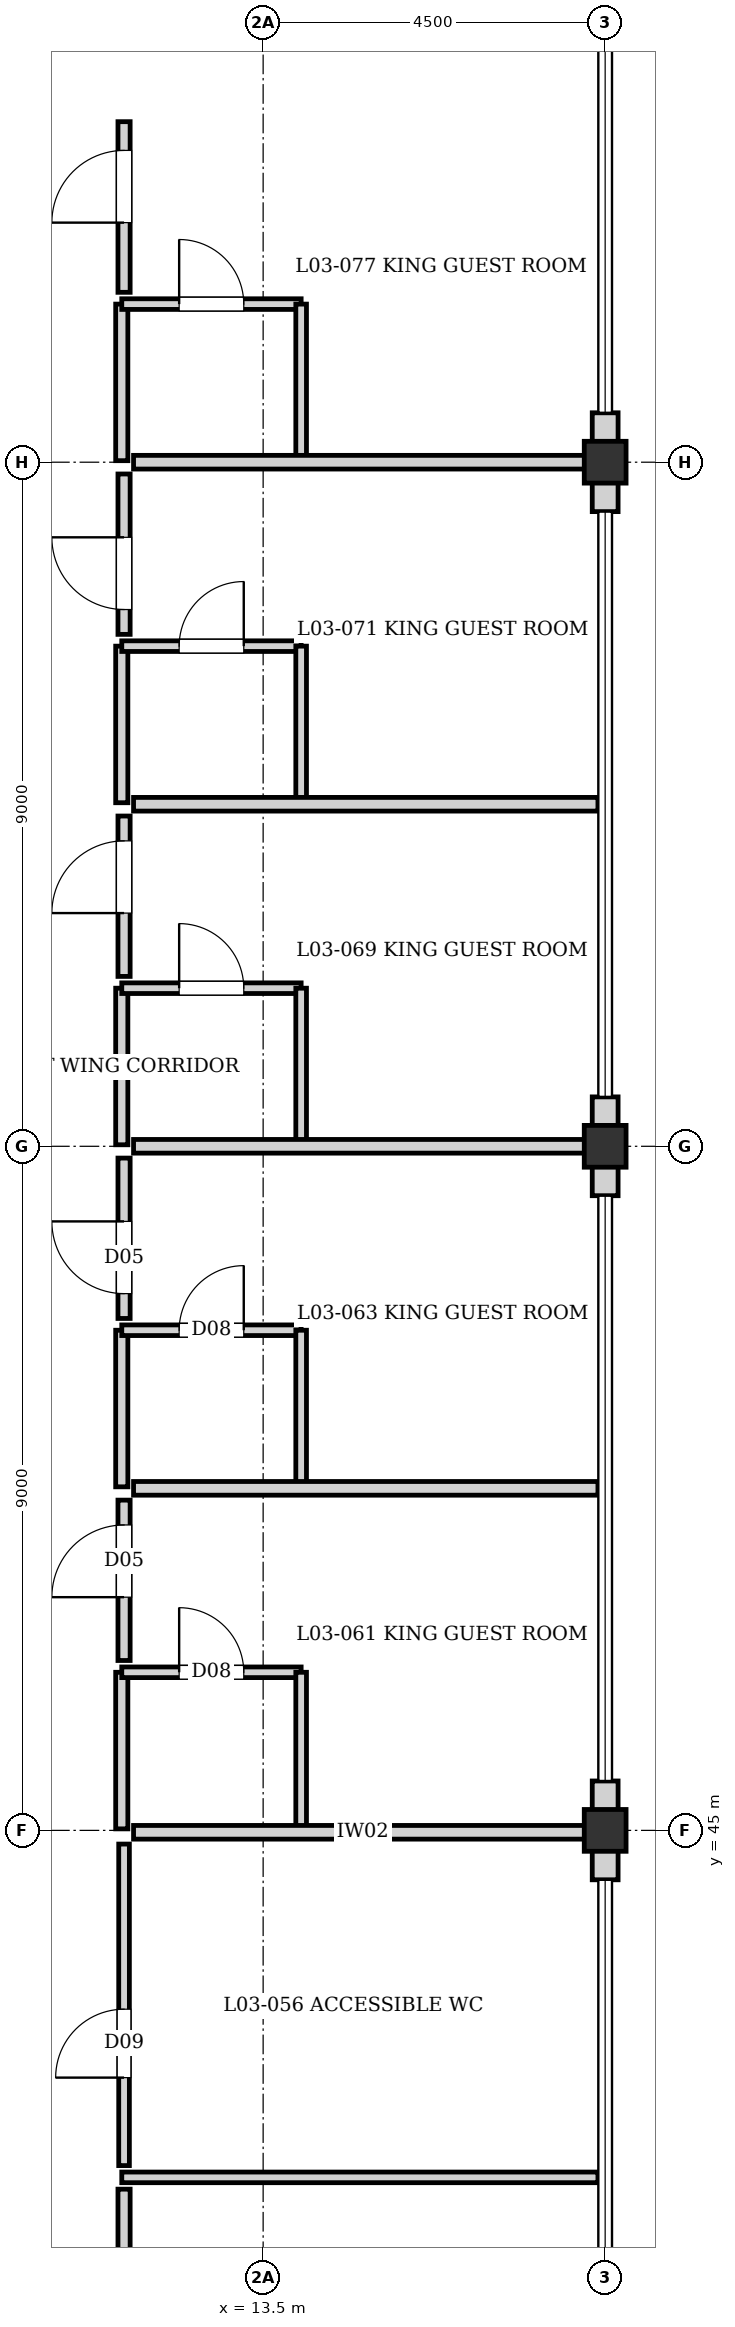
"""IFC4 building model, lengths in metres.
Left out: names, types, materials, properties, quantities, classifications, styles, units other than length and angle.
Written with IfcOpenShell. Run it as: python <this file> out.ifc"""

import sys

from ifc_helpers import new_model, si_unit, direction, frame, frame_2d, origin, origin_2d, place, context, subcontext, project, spatial, rectangle, extrude, element, fill, save


model = new_model("IFC4")
c1 = context("Model", 3, precision=1e-05, world=origin(), true_north=direction((0.0, 1.0)))
c2 = subcontext(c1, "Body", "Model", "MODEL_VIEW")
j1 = project(units=[si_unit("LENGTHUNIT", "METRE"), si_unit("PLANEANGLEUNIT", "RADIAN")], contexts=[c1])
p1 = place(None, origin())
s1 = spatial("IfcSite", under=j1, at=p1, CompositionType="ELEMENT")
p2 = place(p1, origin())
s2 = spatial("IfcBuilding", under=s1, at=p2, CompositionType="ELEMENT")
p3 = place(p2, frame((0.0, 0.0, 11.52)))
s3 = spatial("IfcBuildingStorey", under=s2, at=p3, CompositionType="ELEMENT", Elevation=11.52)
for number, where, z_axis, x_axis in (
    (1, (18.0, 45.0, 0.0), (0.0, 0.0, 1.0), (1.0, 0.0, 0.0)),
    (2, (18.0, 54.0, 0.0), (0.0, 0.0, 1.0), (1.0, 0.0, 0.0)),
    (3, (18.0, 63.0, 0.0), (0.0, 0.0, 1.0), (1.0, 0.0, 0.0)),
):
    element("IfcColumn", number, at=place(p3, frame(where, z_axis=z_axis, x_axis=x_axis)), inside=s3, PredefinedType="COLUMN", context=c2, shape_type="SweptSolid", body=[
        extrude(rectangle(XDim=0.55, YDim=0.55, at=origin_2d()), origin(), (0.0, 0.0, 1.0), 3.04),
    ])
p4 = place(p3, frame((18.0, 63.65, 0.0), z_axis=(0.0, 0.0, 1.0), x_axis=(0.0, -1.0, 0.0)))
e4 = element("IfcWall", 4, at=p4, inside=s3, PredefinedType="SOLIDWALL", context=c2, shape_type="SweptSolid", body=[
    extrude(rectangle(XDim=0.65, YDim=0.34, at=frame_2d((0.325, 0.0))), origin(), (0.0, 0.0, 1.0), 2.48),
])
for number, where, z_axis, x_axis in (
    (5, (18.0, 63.0, 0.0), (0.0, 0.0, 1.0), (0.0, -1.0, 0.0)),
    (6, (18.0, 54.65, 0.0), (0.0, 0.0, 1.0), (0.0, -1.0, 0.0)),
):
    element("IfcWall", number, at=place(p3, frame(where, z_axis=z_axis, x_axis=x_axis)), inside=s3, PredefinedType="SOLIDWALL", context=c2, shape_type="SweptSolid", body=[
        extrude(rectangle(XDim=0.65, YDim=0.34, at=frame_2d((0.325, 0.0))), origin(), (0.0, 0.0, 1.0), 2.82),
    ])
for number, where, z_axis, x_axis in (
    (7, (18.0, 54.0, 0.0), (0.0, 0.0, 1.0), (0.0, -1.0, 0.0)),
    (8, (18.0, 45.65, 0.0), (0.0, 0.0, 1.0), (0.0, -1.0, 0.0)),
):
    element("IfcWall", number, at=place(p3, frame(where, z_axis=z_axis, x_axis=x_axis)), inside=s3, PredefinedType="SOLIDWALL", context=c2, shape_type="SweptSolid", body=[
        extrude(rectangle(XDim=0.65, YDim=0.34, at=frame_2d((0.325, 0.0))), origin(), (0.0, 0.0, 1.0), 2.38),
    ])
p5 = place(p3, frame((18.0, 45.0, 0.0), z_axis=(0.0, 0.0, 1.0), x_axis=(0.0, -1.0, 0.0)))
e9 = element("IfcWall", 9, at=p5, inside=s3, PredefinedType="SOLIDWALL", context=c2, shape_type="SweptSolid", body=[
    extrude(rectangle(XDim=0.65, YDim=0.34, at=frame_2d((0.325, 0.0))), origin(), (0.0, 0.0, 1.0), 2.42),
])
p6 = place(p3, frame((11.64, 45.02, 0.0), z_axis=(0.0, 0.0, 1.0), x_axis=(0.0, 1.0, 0.0)))
e10 = element("IfcWall", 10, at=p6, inside=s3, PredefinedType="PARTITIONING", context=c2, shape_type="SweptSolid", body=[
    extrude(rectangle(XDim=2.06, YDim=0.16, at=frame_2d((1.03, 0.0))), origin(), (0.0, 0.0, 1.0), 2.82),
])
p7 = place(p3, frame((11.64, 47.08, 0.0), z_axis=(0.0, 0.0, 1.0), x_axis=(1.0, 0.0, 0.0)))
e11 = element("IfcWall", 11, at=p7, inside=s3, PredefinedType="PLUMBINGWALL", context=c2, shape_type="SweptSolid", body=[
    extrude(rectangle(XDim=2.36, YDim=0.14, at=frame_2d((1.18, 0.0))), origin(), (0.0, 0.0, 1.0), 2.82),
])
p8 = place(p7, frame((0.755, 0.0, 0.0)))
e12 = element("IfcOpeningElement", 12, at=p8, cuts=e11, PredefinedType="OPENING", context=c2, shape_type="SweptSolid", body=[
    extrude(rectangle(XDim=0.85, YDim=2.04, at=frame_2d((0.425, 1.02))), frame((0.0, 0.08, 0.0), z_axis=(0.0, -1.0, 0.0), x_axis=(1.0, 0.0, 0.0)), (0.0, 0.0, 1.0), 0.16),
])
p9 = place(p3, frame((14.0, 45.02, 0.0), z_axis=(0.0, 0.0, 1.0), x_axis=(0.0, 1.0, 0.0)))
e13 = element("IfcWall", 13, at=p9, inside=s3, PredefinedType="PLUMBINGWALL", context=c2, shape_type="SweptSolid", body=[
    extrude(rectangle(XDim=2.06, YDim=0.14, at=frame_2d((1.03, 0.0))), origin(), (0.0, 0.0, 1.0), 2.82),
])
p10 = place(p3, frame((11.64, 49.52, 0.0), z_axis=(0.0, 0.0, 1.0), x_axis=(0.0, 1.0, 0.0)))
e14 = element("IfcWall", 14, at=p10, inside=s3, PredefinedType="PARTITIONING", context=c2, shape_type="SweptSolid", body=[
    extrude(rectangle(XDim=2.06, YDim=0.16, at=frame_2d((1.03, 0.0))), origin(), (0.0, 0.0, 1.0), 2.82),
])
p11 = place(p3, frame((11.64, 51.58, 0.0), z_axis=(0.0, 0.0, 1.0), x_axis=(1.0, 0.0, 0.0)))
e15 = element("IfcWall", 15, at=p11, inside=s3, PredefinedType="PLUMBINGWALL", context=c2, shape_type="SweptSolid", body=[
    extrude(rectangle(XDim=2.36, YDim=0.14, at=frame_2d((1.18, 0.0))), origin(), (0.0, 0.0, 1.0), 2.82),
])
p12 = place(p11, frame((0.755, 0.0, 0.0)))
e16 = element("IfcOpeningElement", 16, at=p12, cuts=e15, PredefinedType="OPENING", context=c2, shape_type="SweptSolid", body=[
    extrude(rectangle(XDim=0.85, YDim=2.04, at=frame_2d((0.425, 1.02))), frame((0.0, 0.08, 0.0), z_axis=(0.0, -1.0, 0.0), x_axis=(1.0, 0.0, 0.0)), (0.0, 0.0, 1.0), 0.16),
])
p13 = place(p3, frame((14.0, 49.52, 0.0), z_axis=(0.0, 0.0, 1.0), x_axis=(0.0, 1.0, 0.0)))
e17 = element("IfcWall", 17, at=p13, inside=s3, PredefinedType="PLUMBINGWALL", context=c2, shape_type="SweptSolid", body=[
    extrude(rectangle(XDim=2.06, YDim=0.14, at=frame_2d((1.03, 0.0))), origin(), (0.0, 0.0, 1.0), 2.82),
])
p14 = place(p3, frame((11.64, 54.02, 0.0), z_axis=(0.0, 0.0, 1.0), x_axis=(0.0, 1.0, 0.0)))
e18 = element("IfcWall", 18, at=p14, inside=s3, PredefinedType="PARTITIONING", context=c2, shape_type="SweptSolid", body=[
    extrude(rectangle(XDim=2.06, YDim=0.16, at=frame_2d((1.03, 0.0))), origin(), (0.0, 0.0, 1.0), 2.82),
])
p15 = place(p3, frame((11.64, 56.08, 0.0), z_axis=(0.0, 0.0, 1.0), x_axis=(1.0, 0.0, 0.0)))
e19 = element("IfcWall", 19, at=p15, inside=s3, PredefinedType="PLUMBINGWALL", context=c2, shape_type="SweptSolid", body=[
    extrude(rectangle(XDim=2.36, YDim=0.14, at=frame_2d((1.18, 0.0))), origin(), (0.0, 0.0, 1.0), 2.82),
])
p16 = place(p15, frame((0.755, 0.0, 0.0)))
e20 = element("IfcOpeningElement", 20, at=p16, cuts=e19, PredefinedType="OPENING", context=c2, shape_type="SweptSolid", body=[
    extrude(rectangle(XDim=0.85, YDim=2.04, at=frame_2d((0.425, 1.02))), frame((0.0, 0.08, 0.0), z_axis=(0.0, -1.0, 0.0), x_axis=(1.0, 0.0, 0.0)), (0.0, 0.0, 1.0), 0.16),
])
p17 = place(p3, frame((14.0, 54.02, 0.0), z_axis=(0.0, 0.0, 1.0), x_axis=(0.0, 1.0, 0.0)))
e21 = element("IfcWall", 21, at=p17, inside=s3, PredefinedType="PLUMBINGWALL", context=c2, shape_type="SweptSolid", body=[
    extrude(rectangle(XDim=2.06, YDim=0.14, at=frame_2d((1.03, 0.0))), origin(), (0.0, 0.0, 1.0), 2.82),
])
p18 = place(p3, frame((11.64, 58.52, 0.0), z_axis=(0.0, 0.0, 1.0), x_axis=(0.0, 1.0, 0.0)))
e22 = element("IfcWall", 22, at=p18, inside=s3, PredefinedType="PARTITIONING", context=c2, shape_type="SweptSolid", body=[
    extrude(rectangle(XDim=2.06, YDim=0.16, at=frame_2d((1.03, 0.0))), origin(), (0.0, 0.0, 1.0), 2.82),
])
p19 = place(p3, frame((11.64, 60.58, 0.0), z_axis=(0.0, 0.0, 1.0), x_axis=(1.0, 0.0, 0.0)))
e23 = element("IfcWall", 23, at=p19, inside=s3, PredefinedType="PLUMBINGWALL", context=c2, shape_type="SweptSolid", body=[
    extrude(rectangle(XDim=2.36, YDim=0.14, at=frame_2d((1.18, 0.0))), origin(), (0.0, 0.0, 1.0), 2.82),
])
p20 = place(p19, frame((0.755, 0.0, 0.0)))
e24 = element("IfcOpeningElement", 24, at=p20, cuts=e23, PredefinedType="OPENING", context=c2, shape_type="SweptSolid", body=[
    extrude(rectangle(XDim=0.85, YDim=2.04, at=frame_2d((0.425, 1.02))), frame((0.0, 0.08, 0.0), z_axis=(0.0, -1.0, 0.0), x_axis=(1.0, 0.0, 0.0)), (0.0, 0.0, 1.0), 0.16),
])
p21 = place(p3, frame((14.0, 58.52, 0.0), z_axis=(0.0, 0.0, 1.0), x_axis=(0.0, 1.0, 0.0)))
e25 = element("IfcWall", 25, at=p21, inside=s3, PredefinedType="PLUMBINGWALL", context=c2, shape_type="SweptSolid", body=[
    extrude(rectangle(XDim=2.06, YDim=0.14, at=frame_2d((1.03, 0.0))), origin(), (0.0, 0.0, 1.0), 2.82),
])
p22 = place(p3, frame((11.64, 63.02, 0.0), z_axis=(0.0, 0.0, 1.0), x_axis=(0.0, 1.0, 0.0)))
e26 = element("IfcWall", 26, at=p22, inside=s3, PredefinedType="PARTITIONING", context=c2, shape_type="SweptSolid", body=[
    extrude(rectangle(XDim=2.06, YDim=0.16, at=frame_2d((1.03, 0.0))), origin(), (0.0, 0.0, 1.0), 2.82),
])
p23 = place(p3, frame((11.64, 65.08, 0.0), z_axis=(0.0, 0.0, 1.0), x_axis=(1.0, 0.0, 0.0)))
e27 = element("IfcWall", 27, at=p23, inside=s3, PredefinedType="PLUMBINGWALL", context=c2, shape_type="SweptSolid", body=[
    extrude(rectangle(XDim=2.36, YDim=0.14, at=frame_2d((1.18, 0.0))), origin(), (0.0, 0.0, 1.0), 2.82),
])
p24 = place(p23, frame((0.755, 0.0, 0.0)))
e28 = element("IfcOpeningElement", 28, at=p24, cuts=e27, PredefinedType="OPENING", context=c2, shape_type="SweptSolid", body=[
    extrude(rectangle(XDim=0.85, YDim=2.04, at=frame_2d((0.425, 1.02))), frame((0.0, 0.08, 0.0), z_axis=(0.0, -1.0, 0.0), x_axis=(1.0, 0.0, 0.0)), (0.0, 0.0, 1.0), 0.16),
])
p25 = place(p3, frame((14.0, 63.02, 0.0), z_axis=(0.0, 0.0, 1.0), x_axis=(0.0, 1.0, 0.0)))
e29 = element("IfcWall", 29, at=p25, inside=s3, PredefinedType="PLUMBINGWALL", context=c2, shape_type="SweptSolid", body=[
    extrude(rectangle(XDim=2.06, YDim=0.14, at=frame_2d((1.03, 0.0))), origin(), (0.0, 0.0, 1.0), 2.82),
])
p26 = place(p3, frame((11.795, 44.975, 0.0), z_axis=(0.0, 0.0, 1.0), x_axis=(1.0, 0.0, 0.0)))
e30 = element("IfcWall", 30, at=p26, inside=s3, PredefinedType="PARTITIONING", context=c2, shape_type="SweptSolid", body=[
    extrude(rectangle(XDim=6.03, YDim=0.18, at=frame_2d((3.015, 0.0))), origin(), (0.0, 0.0, 1.0), 2.42),
])
p27 = place(p3, frame((11.795, 49.5, 0.0), z_axis=(0.0, 0.0, 1.0), x_axis=(1.0, 0.0, 0.0)))
e31 = element("IfcWall", 31, at=p27, inside=s3, PredefinedType="PARTITIONING", context=c2, shape_type="SweptSolid", body=[
    extrude(rectangle(XDim=6.11, YDim=0.18, at=frame_2d((3.055, 0.0))), origin(), (0.0, 0.0, 1.0), 2.82),
])
p28 = place(p3, frame((11.795, 54.0, 0.0), z_axis=(0.0, 0.0, 1.0), x_axis=(1.0, 0.0, 0.0)))
e32 = element("IfcWall", 32, at=p28, inside=s3, PredefinedType="PARTITIONING", context=c2, shape_type="SweptSolid", body=[
    extrude(rectangle(XDim=6.03, YDim=0.18, at=frame_2d((3.015, 0.0))), origin(), (0.0, 0.0, 1.0), 2.42),
])
p29 = place(p3, frame((11.795, 58.5, 0.0), z_axis=(0.0, 0.0, 1.0), x_axis=(1.0, 0.0, 0.0)))
e33 = element("IfcWall", 33, at=p29, inside=s3, PredefinedType="PARTITIONING", context=c2, shape_type="SweptSolid", body=[
    extrude(rectangle(XDim=6.11, YDim=0.18, at=frame_2d((3.055, 0.0))), origin(), (0.0, 0.0, 1.0), 2.82),
])
p30 = place(p3, frame((11.795, 63.0, 0.0), z_axis=(0.0, 0.0, 1.0), x_axis=(1.0, 0.0, 0.0)))
e34 = element("IfcWall", 34, at=p30, inside=s3, PredefinedType="PARTITIONING", context=c2, shape_type="SweptSolid", body=[
    extrude(rectangle(XDim=6.03, YDim=0.18, at=frame_2d((3.015, 0.0))), origin(), (0.0, 0.0, 1.0), 2.42),
])
p31 = place(p3, frame((11.64, 40.435, 0.0), z_axis=(0.0, 0.0, 1.0), x_axis=(1.0, 0.0, 0.0)))
e35 = element("IfcWall", 35, at=p31, inside=s3, PredefinedType="PLUMBINGWALL", context=c2, shape_type="SweptSolid", body=[
    extrude(rectangle(XDim=6.265, YDim=0.14, at=frame_2d((3.133, 0.0))), origin(), (0.0, 0.0, 1.0), 2.82),
])
p32 = place(p3, frame((11.67, 36.155, 0.0), z_axis=(0.0, 0.0, 1.0), x_axis=(0.0, 1.0, 0.0)))
e36 = element("IfcWall", 36, at=p32, inside=s3, PredefinedType="PARTITIONING", context=c2, shape_type="SweptSolid", body=[
    extrude(rectangle(XDim=4.125, YDim=0.16, at=frame_2d((2.062, 0.0))), origin(), (0.0, 0.0, 1.0), 2.82),
])
p33 = place(p32, frame((2.058, 0.0, 0.0)))
e37 = element("IfcOpeningElement", 37, at=p33, cuts=e36, PredefinedType="OPENING", context=c2, shape_type="SweptSolid", body=[
    extrude(rectangle(XDim=1.0, YDim=2.1, at=frame_2d((0.5, 1.05))), frame((0.0, 0.09, 0.0), z_axis=(0.0, -1.0, 0.0), x_axis=(1.0, 0.0, 0.0)), (0.0, 0.0, 1.0), 0.18),
])
p34 = place(p3, frame((11.67, 40.59, 0.0), z_axis=(0.0, 0.0, 1.0), x_axis=(0.0, 1.0, 0.0)))
e38 = element("IfcWall", 38, at=p34, inside=s3, PredefinedType="PLUMBINGWALL", context=c2, shape_type="SweptSolid", body=[
    extrude(rectangle(XDim=4.23, YDim=0.14, at=frame_2d((2.115, 0.0))), origin(), (0.0, 0.0, 1.0), 2.82),
])
p35 = place(p34, frame((1.157, 0.0, 0.0)))
e39 = element("IfcOpeningElement", 39, at=p35, cuts=e38, PredefinedType="OPENING", context=c2, shape_type="SweptSolid", body=[
    extrude(rectangle(XDim=0.9, YDim=2.1, at=frame_2d((0.45, 1.05))), frame((0.0, 0.08, 0.0), z_axis=(0.0, -1.0, 0.0), x_axis=(1.0, 0.0, 0.0)), (0.0, 0.0, 1.0), 0.16),
])
p36 = place(p3, frame((11.67, 47.235, 0.0), z_axis=(0.0, 0.0, 1.0), x_axis=(0.0, 1.0, 0.0)))
e40 = element("IfcWall", 40, at=p36, inside=s3, PredefinedType="PARTITIONING", context=c2, shape_type="SweptSolid", body=[
    extrude(rectangle(XDim=2.11, YDim=0.16, at=frame_2d((1.055, 0.0))), origin(), (0.0, 0.0, 1.0), 2.82),
])
p37 = place(p36, frame((0.833, 0.0, 0.0)))
e41 = element("IfcOpeningElement", 41, at=p37, cuts=e40, PredefinedType="OPENING", context=c2, shape_type="SweptSolid", body=[
    extrude(rectangle(XDim=0.95, YDim=2.15, at=frame_2d((0.475, 1.075))), frame((0.0, 0.09, 0.0), z_axis=(0.0, -1.0, 0.0), x_axis=(1.0, 0.0, 0.0)), (0.0, 0.0, 1.0), 0.18),
])
p38 = place(p3, frame((11.67, 51.735, 0.0), z_axis=(0.0, 0.0, 1.0), x_axis=(0.0, 1.0, 0.0)))
e42 = element("IfcWall", 42, at=p38, inside=s3, PredefinedType="PARTITIONING", context=c2, shape_type="SweptSolid", body=[
    extrude(rectangle(XDim=2.11, YDim=0.16, at=frame_2d((1.055, 0.0))), origin(), (0.0, 0.0, 1.0), 2.82),
])
p39 = place(p38, frame((0.327, 0.0, 0.0)))
e43 = element("IfcOpeningElement", 43, at=p39, cuts=e42, PredefinedType="OPENING", context=c2, shape_type="SweptSolid", body=[
    extrude(rectangle(XDim=0.95, YDim=2.15, at=frame_2d((0.475, 1.075))), frame((0.0, 0.09, 0.0), z_axis=(0.0, -1.0, 0.0), x_axis=(1.0, 0.0, 0.0)), (0.0, 0.0, 1.0), 0.18),
])
p40 = place(p3, frame((11.67, 56.235, 0.0), z_axis=(0.0, 0.0, 1.0), x_axis=(0.0, 1.0, 0.0)))
e44 = element("IfcWall", 44, at=p40, inside=s3, PredefinedType="PARTITIONING", context=c2, shape_type="SweptSolid", body=[
    extrude(rectangle(XDim=2.11, YDim=0.16, at=frame_2d((1.055, 0.0))), origin(), (0.0, 0.0, 1.0), 2.82),
])
p41 = place(p40, frame((0.833, 0.0, 0.0)))
e45 = element("IfcOpeningElement", 45, at=p41, cuts=e44, PredefinedType="OPENING", context=c2, shape_type="SweptSolid", body=[
    extrude(rectangle(XDim=0.95, YDim=2.15, at=frame_2d((0.475, 1.075))), frame((0.0, 0.09, 0.0), z_axis=(0.0, -1.0, 0.0), x_axis=(1.0, 0.0, 0.0)), (0.0, 0.0, 1.0), 0.18),
])
p42 = place(p3, frame((11.67, 60.735, 0.0), z_axis=(0.0, 0.0, 1.0), x_axis=(0.0, 1.0, 0.0)))
e46 = element("IfcWall", 46, at=p42, inside=s3, PredefinedType="PARTITIONING", context=c2, shape_type="SweptSolid", body=[
    extrude(rectangle(XDim=2.11, YDim=0.16, at=frame_2d((1.055, 0.0))), origin(), (0.0, 0.0, 1.0), 2.82),
])
p43 = place(p42, frame((0.327, 0.0, 0.0)))
e47 = element("IfcOpeningElement", 47, at=p43, cuts=e46, PredefinedType="OPENING", context=c2, shape_type="SweptSolid", body=[
    extrude(rectangle(XDim=0.95, YDim=2.15, at=frame_2d((0.475, 1.075))), frame((0.0, 0.09, 0.0), z_axis=(0.0, -1.0, 0.0), x_axis=(1.0, 0.0, 0.0)), (0.0, 0.0, 1.0), 0.18),
])
p44 = place(p3, frame((11.67, 65.235, 0.0), z_axis=(0.0, 0.0, 1.0), x_axis=(0.0, 1.0, 0.0)))
e48 = element("IfcWall", 48, at=p44, inside=s3, PredefinedType="PARTITIONING", context=c2, shape_type="SweptSolid", body=[
    extrude(rectangle(XDim=2.245, YDim=0.16, at=frame_2d((1.123, 0.0))), origin(), (0.0, 0.0, 1.0), 2.82),
])
p45 = place(p44, frame((0.917, 0.0, 0.0)))
e49 = element("IfcOpeningElement", 49, at=p45, cuts=e48, PredefinedType="OPENING", context=c2, shape_type="SweptSolid", body=[
    extrude(rectangle(XDim=0.95, YDim=2.15, at=frame_2d((0.475, 1.075))), frame((0.0, 0.09, 0.0), z_axis=(0.0, -1.0, 0.0), x_axis=(1.0, 0.0, 0.0)), (0.0, 0.0, 1.0), 0.18),
])
p46 = place(p8, origin())
e50 = element("IfcDoor", 50, at=p46, inside=s3, OperationType="SINGLE_SWING_LEFT", PredefinedType="DOOR", context=c2, shape_type="SweptSolid", body=[
    extrude(rectangle(XDim=0.85, YDim=2.04, at=frame_2d((0.425, 1.02))), frame((0.0, 0.025, 0.0), z_axis=(0.0, -1.0, 0.0), x_axis=(1.0, 0.0, 0.0)), (0.0, 0.0, 1.0), 0.05),
])
fill(e12, e50)
p47 = place(p12, origin())
e51 = element("IfcDoor", 51, at=p47, inside=s3, OperationType="SINGLE_SWING_RIGHT", PredefinedType="DOOR", context=c2, shape_type="SweptSolid", body=[
    extrude(rectangle(XDim=0.85, YDim=2.04, at=frame_2d((0.425, 1.02))), frame((0.0, 0.025, 0.0), z_axis=(0.0, -1.0, 0.0), x_axis=(1.0, 0.0, 0.0)), (0.0, 0.0, 1.0), 0.05),
])
fill(e16, e51)
p48 = place(p16, origin())
e52 = element("IfcDoor", 52, at=p48, inside=s3, OperationType="SINGLE_SWING_LEFT", PredefinedType="DOOR", context=c2, shape_type="SweptSolid", body=[
    extrude(rectangle(XDim=0.85, YDim=2.04, at=frame_2d((0.425, 1.02))), frame((0.0, 0.025, 0.0), z_axis=(0.0, -1.0, 0.0), x_axis=(1.0, 0.0, 0.0)), (0.0, 0.0, 1.0), 0.05),
])
fill(e20, e52)
p49 = place(p20, origin())
e53 = element("IfcDoor", 53, at=p49, inside=s3, OperationType="SINGLE_SWING_RIGHT", PredefinedType="DOOR", context=c2, shape_type="SweptSolid", body=[
    extrude(rectangle(XDim=0.85, YDim=2.04, at=frame_2d((0.425, 1.02))), frame((0.0, 0.025, 0.0), z_axis=(0.0, -1.0, 0.0), x_axis=(1.0, 0.0, 0.0)), (0.0, 0.0, 1.0), 0.05),
])
fill(e24, e53)
p50 = place(p24, origin())
e54 = element("IfcDoor", 54, at=p50, inside=s3, OperationType="SINGLE_SWING_LEFT", PredefinedType="DOOR", context=c2, shape_type="SweptSolid", body=[
    extrude(rectangle(XDim=0.85, YDim=2.04, at=frame_2d((0.425, 1.02))), frame((0.0, 0.025, 0.0), z_axis=(0.0, -1.0, 0.0), x_axis=(1.0, 0.0, 0.0)), (0.0, 0.0, 1.0), 0.05),
])
fill(e28, e54)
p51 = place(p35, origin())
e55 = element("IfcDoor", 55, at=p51, inside=s3, OperationType="SINGLE_SWING_LEFT", PredefinedType="DOOR", context=c2, shape_type="SweptSolid", body=[
    extrude(rectangle(XDim=0.9, YDim=2.1, at=frame_2d((0.45, 1.05))), frame((0.0, 0.025, 0.0), z_axis=(0.0, -1.0, 0.0), x_axis=(1.0, 0.0, 0.0)), (0.0, 0.0, 1.0), 0.05),
])
fill(e39, e55)
p52 = place(p37, origin())
e56 = element("IfcDoor", 56, at=p52, inside=s3, OperationType="SINGLE_SWING_LEFT", PredefinedType="DOOR", context=c2, shape_type="SweptSolid", body=[
    extrude(rectangle(XDim=0.95, YDim=2.15, at=frame_2d((0.475, 1.075))), frame((0.0, 0.025, 0.0), z_axis=(0.0, -1.0, 0.0), x_axis=(1.0, 0.0, 0.0)), (0.0, 0.0, 1.0), 0.05),
])
fill(e41, e56)
p53 = place(p39, origin())
e57 = element("IfcDoor", 57, at=p53, inside=s3, OperationType="SINGLE_SWING_RIGHT", PredefinedType="DOOR", context=c2, shape_type="SweptSolid", body=[
    extrude(rectangle(XDim=0.95, YDim=2.15, at=frame_2d((0.475, 1.075))), frame((0.0, 0.025, 0.0), z_axis=(0.0, -1.0, 0.0), x_axis=(1.0, 0.0, 0.0)), (0.0, 0.0, 1.0), 0.05),
])
fill(e43, e57)
p54 = place(p41, origin())
e58 = element("IfcDoor", 58, at=p54, inside=s3, OperationType="SINGLE_SWING_LEFT", PredefinedType="DOOR", context=c2, shape_type="SweptSolid", body=[
    extrude(rectangle(XDim=0.95, YDim=2.15, at=frame_2d((0.475, 1.075))), frame((0.0, 0.025, 0.0), z_axis=(0.0, -1.0, 0.0), x_axis=(1.0, 0.0, 0.0)), (0.0, 0.0, 1.0), 0.05),
])
fill(e45, e58)
p55 = place(p43, origin())
e59 = element("IfcDoor", 59, at=p55, inside=s3, OperationType="SINGLE_SWING_RIGHT", PredefinedType="DOOR", context=c2, shape_type="SweptSolid", body=[
    extrude(rectangle(XDim=0.95, YDim=2.15, at=frame_2d((0.475, 1.075))), frame((0.0, 0.025, 0.0), z_axis=(0.0, -1.0, 0.0), x_axis=(1.0, 0.0, 0.0)), (0.0, 0.0, 1.0), 0.05),
])
fill(e47, e59)
p56 = place(p45, origin())
e60 = element("IfcDoor", 60, at=p56, inside=s3, OperationType="SINGLE_SWING_LEFT", PredefinedType="DOOR", context=c2, shape_type="SweptSolid", body=[
    extrude(rectangle(XDim=0.95, YDim=2.15, at=frame_2d((0.475, 1.075))), frame((0.0, 0.025, 0.0), z_axis=(0.0, -1.0, 0.0), x_axis=(1.0, 0.0, 0.0)), (0.0, 0.0, 1.0), 0.05),
])
fill(e49, e60)
save(model, sys.argv[1])
